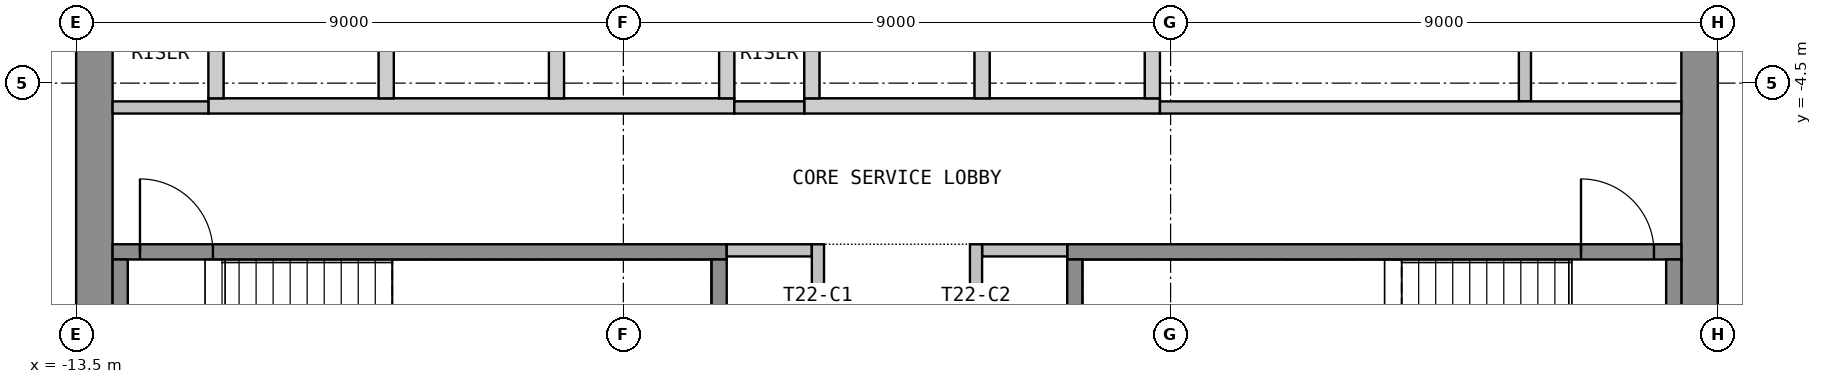
"""IFC4 building model, lengths in metres.
Left out: names, types, materials, properties, quantities, classifications, styles, units other than length and angle.
Written with IfcOpenShell. Run it as: python <this file> out.ifc"""

import sys

from ifc_helpers import new_model, si_unit, direction, frame, frame_2d, origin, place, context, subcontext, project, spatial, polyline, rectangle, outline, extrude, element, fill, save


model = new_model("IFC4")
c1 = context("Model", 3, precision=1e-05, world=origin(), true_north=direction((0.0, 1.0)))
c2 = subcontext(c1, "Body", "Model", "MODEL_VIEW")
j1 = project(units=[si_unit("LENGTHUNIT", "METRE"), si_unit("PLANEANGLEUNIT", "RADIAN")], contexts=[c1])
p1 = place(None, origin())
s1 = spatial("IfcSite", under=j1, at=p1, CompositionType="ELEMENT")
p2 = place(p1, origin())
s2 = spatial("IfcBuilding", under=s1, at=p2, CompositionType="ELEMENT")
p3 = place(p2, frame((0.0, 0.0, 298.2)))
s3 = spatial("IfcBuildingStorey", under=s2, at=p3, CompositionType="ELEMENT", Elevation=298.2)
p4 = place(p3, frame((-13.2, -10.65, 0.0), z_axis=(0.0, 0.0, 1.0), x_axis=(0.0, 1.0, 0.0)))
e1 = element("IfcWall", 1, at=p4, inside=s3, PredefinedType="SHEAR", context=c2, shape_type="SweptSolid", body=[
    extrude(rectangle(XDim=21.3, YDim=0.6, at=frame_2d((10.65, 0.0))), origin(), (0.0, 0.0, 1.0), 3.575),
])
p5 = place(p4, frame((9.45, 0.0, 0.0)))
e2 = element("IfcOpeningElement", 2, at=p5, cuts=e1, PredefinedType="OPENING", context=c2, shape_type="SweptSolid", body=[
    extrude(rectangle(XDim=2.4, YDim=2.1, at=frame_2d((1.2, 1.05))), frame((0.0, 0.31, 0.0), z_axis=(0.0, -1.0, 0.0), x_axis=(1.0, 0.0, 0.0)), (0.0, 0.0, 1.0), 0.62),
])
p6 = place(p3, frame((13.2, -10.65, 0.0), z_axis=(0.0, 0.0, 1.0), x_axis=(0.0, 1.0, 0.0)))
e3 = element("IfcWall", 3, at=p6, inside=s3, PredefinedType="SHEAR", context=c2, shape_type="SweptSolid", body=[
    extrude(rectangle(XDim=21.3, YDim=0.6, at=frame_2d((10.65, 0.0))), origin(), (0.0, 0.0, 1.0), 3.575),
])
p7 = place(p6, frame((9.45, 0.0, 0.0)))
e4 = element("IfcOpeningElement", 4, at=p7, cuts=e3, PredefinedType="OPENING", context=c2, shape_type="SweptSolid", body=[
    extrude(rectangle(XDim=2.4, YDim=2.1, at=frame_2d((1.2, 1.05))), frame((0.0, 0.31, 0.0), z_axis=(0.0, -1.0, 0.0), x_axis=(1.0, 0.0, 0.0)), (0.0, 0.0, 1.0), 0.62),
])
p8 = place(p3, origin())
e5 = element("IfcWall", 5, at=p8, inside=s3, PredefinedType="SHEAR", context=c2, shape_type="SweptSolid", body=[
    extrude(outline(polyline([(-11.325, -5.0), (-2.675, -5.0), (-2.675, -4.75), (-11.325, -4.75), (-11.325, -5.0)])), origin(), (0.0, 0.0, 1.0), 3.575),
])
p9 = place(p3, origin())
e6 = element("IfcWall", 6, at=p9, inside=s3, PredefinedType="SHEAR", context=c2, shape_type="SweptSolid", body=[
    extrude(outline(polyline([(-1.525, -5.0), (4.325, -5.0), (4.325, -4.75), (-1.525, -4.75), (-1.525, -5.0)])), origin(), (0.0, 0.0, 1.0), 3.575),
])
p10 = place(p3, origin())
e7 = element("IfcWall", 7, at=p10, inside=s3, PredefinedType="SHEAR", context=c2, shape_type="SweptSolid", body=[
    extrude(outline(polyline([(-11.325, -4.75), (-11.075, -4.75), (-11.075, -2.05), (-11.325, -2.05), (-11.325, -4.75)])), origin(), (0.0, 0.0, 1.0), 3.575),
])
p11 = place(p3, origin())
e8 = element("IfcWall", 8, at=p11, inside=s3, PredefinedType="SHEAR", context=c2, shape_type="SweptSolid", body=[
    extrude(outline(polyline([(-8.525, -4.75), (-8.275, -4.75), (-8.275, -2.05), (-8.525, -2.05), (-8.525, -4.75)])), origin(), (0.0, 0.0, 1.0), 3.575),
])
p12 = place(p3, origin())
e9 = element("IfcWall", 9, at=p12, inside=s3, PredefinedType="SHEAR", context=c2, shape_type="SweptSolid", body=[
    extrude(outline(polyline([(-5.725, -4.75), (-5.475, -4.75), (-5.475, -2.05), (-5.725, -2.05), (-5.725, -4.75)])), origin(), (0.0, 0.0, 1.0), 3.575),
])
p13 = place(p3, origin())
e10 = element("IfcWall", 10, at=p13, inside=s3, PredefinedType="SHEAR", context=c2, shape_type="SweptSolid", body=[
    extrude(outline(polyline([(-2.925, -4.75), (-2.675, -4.75), (-2.675, -2.05), (-2.925, -2.05), (-2.925, -4.75)])), origin(), (0.0, 0.0, 1.0), 3.575),
])
p14 = place(p3, origin())
e11 = element("IfcWall", 11, at=p14, inside=s3, PredefinedType="SHEAR", context=c2, shape_type="SweptSolid", body=[
    extrude(outline(polyline([(-1.525, -4.75), (-1.275, -4.75), (-1.275, -2.05), (-1.525, -2.05), (-1.525, -4.75)])), origin(), (0.0, 0.0, 1.0), 3.575),
])
p15 = place(p3, origin())
e12 = element("IfcWall", 12, at=p15, inside=s3, PredefinedType="SHEAR", context=c2, shape_type="SweptSolid", body=[
    extrude(outline(polyline([(1.275, -4.75), (1.525, -4.75), (1.525, -2.05), (1.275, -2.05), (1.275, -4.75)])), origin(), (0.0, 0.0, 1.0), 3.575),
])
p16 = place(p3, origin())
e13 = element("IfcWall", 13, at=p16, inside=s3, PredefinedType="SHEAR", context=c2, shape_type="SweptSolid", body=[
    extrude(outline(polyline([(4.075, -4.75), (4.325, -4.75), (4.325, -2.05), (4.075, -2.05), (4.075, -4.75)])), origin(), (0.0, 0.0, 1.0), 3.575),
])
p17 = place(p3, frame((-12.9, -7.275, 0.0), z_axis=(0.0, 0.0, 1.0), x_axis=(1.0, 0.0, 0.0)))
e14 = element("IfcWall", 14, at=p17, inside=s3, PredefinedType="SHEAR", context=c2, shape_type="SweptSolid", body=[
    extrude(rectangle(XDim=10.1, YDim=0.25, at=frame_2d((5.05, 0.0))), origin(), (0.0, 0.0, 1.0), 3.575),
])
p18 = place(p17, frame((0.45, 0.0, 0.0)))
e15 = element("IfcOpeningElement", 15, at=p18, cuts=e14, PredefinedType="OPENING", context=c2, shape_type="SweptSolid", body=[
    extrude(rectangle(XDim=1.2, YDim=2.1, at=frame_2d((0.6, 1.05))), frame((0.0, 0.135, 0.0), z_axis=(0.0, -1.0, 0.0), x_axis=(1.0, 0.0, 0.0)), (0.0, 0.0, 1.0), 0.27),
])
for number, where, z_axis, x_axis in (
    (16, (-12.775, -10.65, 0.0), (0.0, 0.0, 1.0), (0.0, 1.0, 0.0)),
    (17, (-2.925, -10.65, 0.0), (0.0, 0.0, 1.0), (0.0, 1.0, 0.0)),
):
    element("IfcWall", number, at=place(p3, frame(where, z_axis=z_axis, x_axis=x_axis)), inside=s3, PredefinedType="SHEAR", context=c2, shape_type="SweptSolid", body=[
        extrude(rectangle(XDim=3.25, YDim=0.25, at=frame_2d((1.625, 0.0))), origin(), (0.0, 0.0, 1.0), 3.575),
    ])
p19 = place(p3, frame((2.8, -7.275, 0.0), z_axis=(0.0, 0.0, 1.0), x_axis=(1.0, 0.0, 0.0)))
e18 = element("IfcWall", 18, at=p19, inside=s3, PredefinedType="SHEAR", context=c2, shape_type="SweptSolid", body=[
    extrude(rectangle(XDim=10.1, YDim=0.25, at=frame_2d((5.05, 0.0))), origin(), (0.0, 0.0, 1.0), 3.575),
])
p20 = place(p19, frame((8.45, 0.0, 0.0)))
e19 = element("IfcOpeningElement", 19, at=p20, cuts=e18, PredefinedType="OPENING", context=c2, shape_type="SweptSolid", body=[
    extrude(rectangle(XDim=1.2, YDim=2.1, at=frame_2d((0.6, 1.05))), frame((0.0, 0.135, 0.0), z_axis=(0.0, -1.0, 0.0), x_axis=(1.0, 0.0, 0.0)), (0.0, 0.0, 1.0), 0.27),
])
for number, where, z_axis, x_axis in (
    (20, (2.925, -10.65, 0.0), (0.0, 0.0, 1.0), (0.0, 1.0, 0.0)),
    (21, (12.775, -10.65, 0.0), (0.0, 0.0, 1.0), (0.0, 1.0, 0.0)),
):
    element("IfcWall", number, at=place(p3, frame(where, z_axis=z_axis, x_axis=x_axis)), inside=s3, PredefinedType="SHEAR", context=c2, shape_type="SweptSolid", body=[
        extrude(rectangle(XDim=3.25, YDim=0.25, at=frame_2d((1.625, 0.0))), origin(), (0.0, 0.0, 1.0), 3.575),
    ])
for number, where, z_axis, x_axis in (
    (22, (-2.8, -7.25, 0.0), (0.0, 0.0, 1.0), (1.0, 0.0, 0.0)),
    (23, (1.4, -7.25, 0.0), (0.0, 0.0, 1.0), (1.0, 0.0, 0.0)),
):
    element("IfcWall", number, at=place(p3, frame(where, z_axis=z_axis, x_axis=x_axis)), inside=s3, PredefinedType="PARTITIONING", context=c2, shape_type="SweptSolid", body=[
        extrude(rectangle(XDim=1.4, YDim=0.2, at=frame_2d((0.7, 0.0))), origin(), (0.0, 0.0, 1.0), 3.575),
    ])
p21 = place(p3, frame((-1.3, -10.65, 0.0), z_axis=(0.0, 0.0, 1.0), x_axis=(0.0, 1.0, 0.0)))
e24 = element("IfcWall", 24, at=p21, inside=s3, PredefinedType="PARTITIONING", context=c2, shape_type="SweptSolid", body=[
    extrude(rectangle(XDim=3.5, YDim=0.2, at=frame_2d((1.75, 0.0))), origin(), (0.0, 0.0, 1.0), 3.575),
])
p22 = place(p21, frame((1.2, 0.0, 0.0)))
e25 = element("IfcOpeningElement", 25, at=p22, cuts=e24, PredefinedType="OPENING", context=c2, shape_type="SweptSolid", body=[
    extrude(rectangle(XDim=0.9, YDim=2.1, at=frame_2d((0.45, 1.05))), frame((0.0, 0.11, 0.0), z_axis=(0.0, -1.0, 0.0), x_axis=(1.0, 0.0, 0.0)), (0.0, 0.0, 1.0), 0.22),
])
p23 = place(p3, frame((1.3, -10.65, 0.0), z_axis=(0.0, 0.0, 1.0), x_axis=(0.0, 1.0, 0.0)))
e26 = element("IfcWall", 26, at=p23, inside=s3, PredefinedType="PARTITIONING", context=c2, shape_type="SweptSolid", body=[
    extrude(rectangle(XDim=3.5, YDim=0.2, at=frame_2d((1.75, 0.0))), origin(), (0.0, 0.0, 1.0), 3.575),
])
p24 = place(p23, frame((1.2, 0.0, 0.0)))
e27 = element("IfcOpeningElement", 27, at=p24, cuts=e26, PredefinedType="OPENING", context=c2, shape_type="SweptSolid", body=[
    extrude(rectangle(XDim=0.9, YDim=2.1, at=frame_2d((0.45, 1.05))), frame((0.0, 0.11, 0.0), z_axis=(0.0, -1.0, 0.0), x_axis=(1.0, 0.0, 0.0)), (0.0, 0.0, 1.0), 0.22),
])
p25 = place(p3, frame((-12.9, -4.9, 0.0), z_axis=(0.0, 0.0, 1.0), x_axis=(1.0, 0.0, 0.0)))
e28 = element("IfcWall", 28, at=p25, inside=s3, PredefinedType="PARTITIONING", context=c2, shape_type="SweptSolid", body=[
    extrude(rectangle(XDim=1.575, YDim=0.2, at=frame_2d((0.788, 0.0))), origin(), (0.0, 0.0, 1.0), 3.575),
])
p26 = place(p3, frame((-2.675, -4.9, 0.0), z_axis=(0.0, 0.0, 1.0), x_axis=(1.0, 0.0, 0.0)))
e29 = element("IfcWall", 29, at=p26, inside=s3, PredefinedType="PARTITIONING", context=c2, shape_type="SweptSolid", body=[
    extrude(rectangle(XDim=1.15, YDim=0.2, at=frame_2d((0.575, 0.0))), origin(), (0.0, 0.0, 1.0), 3.575),
])
p27 = place(p3, frame((10.327, -4.8, 0.0), z_axis=(0.0, 0.0, 1.0), x_axis=(0.0, 1.0, 0.0)))
e30 = element("IfcWall", 30, at=p27, inside=s3, PredefinedType="PARTITIONING", context=c2, shape_type="SweptSolid", body=[
    extrude(rectangle(XDim=2.8, YDim=0.2, at=frame_2d((1.4, 0.0))), origin(), (0.0, 0.0, 1.0), 3.575),
])
p28 = place(p3, frame((4.325, -4.9, 0.0), z_axis=(0.0, 0.0, 1.0), x_axis=(1.0, 0.0, 0.0)))
e31 = element("IfcWall", 31, at=p28, inside=s3, PredefinedType="PARTITIONING", context=c2, shape_type="SweptSolid", body=[
    extrude(rectangle(XDim=8.575, YDim=0.2, at=frame_2d((4.288, 0.0))), origin(), (0.0, 0.0, 1.0), 3.575),
])
p29 = place(p18, origin())
e32 = element("IfcDoor", 32, at=p29, inside=s3, OperationType="SINGLE_SWING_LEFT", PredefinedType="DOOR", context=c2, shape_type="SweptSolid", body=[
    extrude(rectangle(XDim=1.2, YDim=2.1, at=frame_2d((0.6, 1.05))), frame((0.0, 0.025, 0.0), z_axis=(0.0, -1.0, 0.0), x_axis=(1.0, 0.0, 0.0)), (0.0, 0.0, 1.0), 0.05),
])
fill(e15, e32)
p30 = place(p20, origin())
e33 = element("IfcDoor", 33, at=p30, inside=s3, OperationType="SINGLE_SWING_LEFT", PredefinedType="DOOR", context=c2, shape_type="SweptSolid", body=[
    extrude(rectangle(XDim=1.2, YDim=2.1, at=frame_2d((0.6, 1.05))), frame((0.0, 0.025, 0.0), z_axis=(0.0, -1.0, 0.0), x_axis=(1.0, 0.0, 0.0)), (0.0, 0.0, 1.0), 0.05),
])
fill(e19, e33)
save(model, sys.argv[1])
